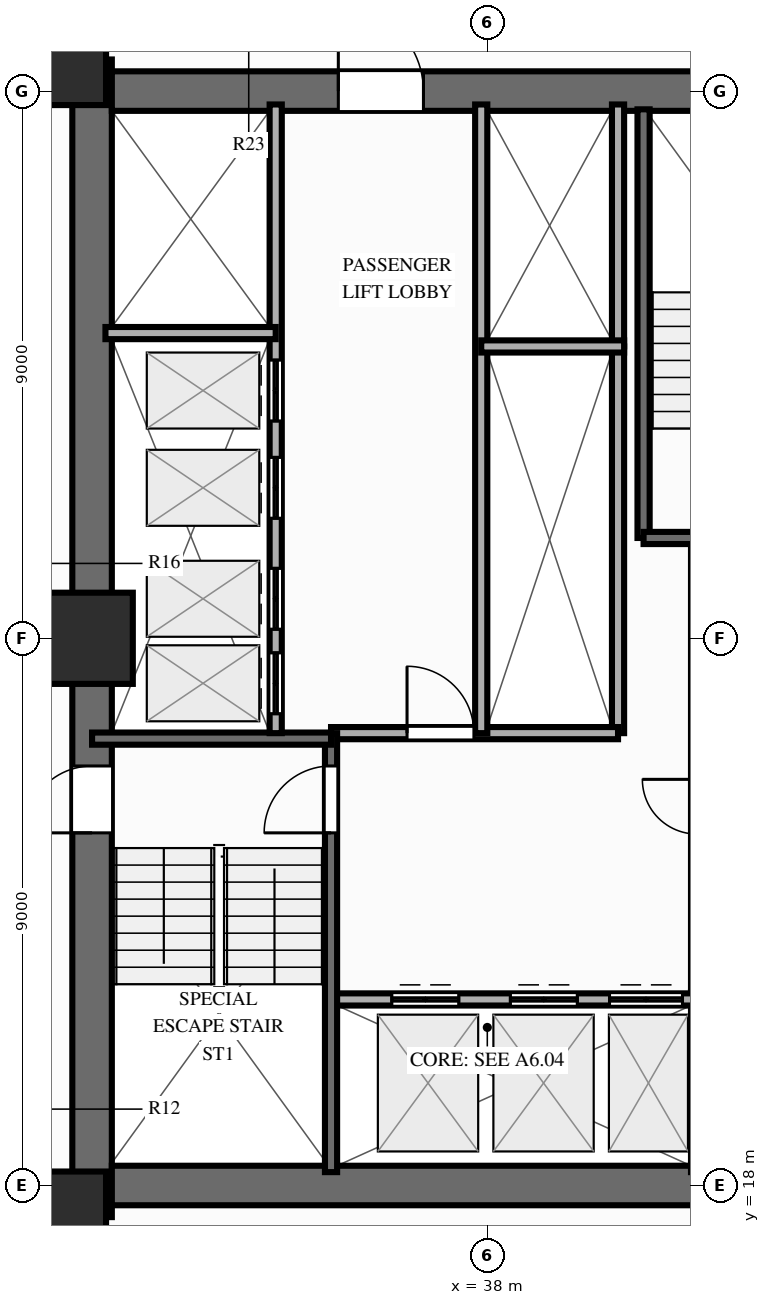
"""IFC4 building model, lengths in metres.
Left out: names, types, materials, properties, quantities, classifications, styles, units other than length and angle.
Written with IfcOpenShell. Run it as: python <this file> out.ifc"""

import sys

from ifc_helpers import new_model, si_unit, direction, frame, frame_2d, origin, origin_2d, place, context, subcontext, project, spatial, rectangle, extrude, source, transform, mapped, element, fill, save


model = new_model("IFC4")
c1 = context("Model", 3, precision=1e-05, world=origin(), true_north=direction((0.0, 1.0)))
c2 = subcontext(c1, "Body", "Model", "MODEL_VIEW")
j1 = project(units=[si_unit("LENGTHUNIT", "METRE"), si_unit("PLANEANGLEUNIT", "RADIAN")], contexts=[c1])
p1 = place(None, origin())
s1 = spatial("IfcSite", under=j1, at=p1, CompositionType="ELEMENT")
p2 = place(p1, origin())
s2 = spatial("IfcBuilding", under=s1, at=p2, CompositionType="ELEMENT")
p3 = place(p2, frame((0.0, 0.0, 46.4)))
s3 = spatial("IfcBuildingStorey", under=s2, at=p3, CompositionType="ELEMENT", Elevation=46.4)
p4 = place(p3, frame((31.5, 17.48, 0.0), z_axis=(0.0, 0.0, 1.0), x_axis=(0.0, 1.0, 0.0)))
e1 = element("IfcWall", 1, at=p4, inside=s3, PredefinedType="SHEAR", context=c2, shape_type="SweptSolid", body=[
    extrude(rectangle(XDim=19.04, YDim=0.65, at=frame_2d((9.52, 0.0))), origin(), (0.0, 0.0, 1.0), 3.0),
])
p5 = place(p4, frame((6.32, 0.0, 0.0)))
e2 = element("IfcOpeningElement", 2, at=p5, cuts=e1, PredefinedType="OPENING", context=c2, shape_type="SweptSolid", body=[
    extrude(rectangle(XDim=1.1, YDim=2.15, at=frame_2d((0.55, 1.075))), frame((0.0, 0.337, 0.0), z_axis=(0.0, -1.0, 0.0), x_axis=(1.0, 0.0, 0.0)), (0.0, 0.0, 1.0), 0.674),
])
p6 = place(p3, frame((31.825, 18.0, 0.0), z_axis=(0.0, 0.0, 1.0), x_axis=(1.0, 0.0, 0.0)))
e3 = element("IfcWall", 3, at=p6, inside=s3, PredefinedType="SHEAR", context=c2, shape_type="SweptSolid", body=[
    extrude(rectangle(XDim=12.35, YDim=0.65, at=frame_2d((6.175, 0.0))), origin(), (0.0, 0.0, 1.0), 3.0),
])
p7 = place(p3, frame((31.825, 36.0, 0.0), z_axis=(0.0, 0.0, 1.0), x_axis=(1.0, 0.0, 0.0)))
e4 = element("IfcWall", 4, at=p7, inside=s3, PredefinedType="SHEAR", context=c2, shape_type="SweptSolid", body=[
    extrude(rectangle(XDim=12.35, YDim=0.65, at=frame_2d((6.175, 0.0))), origin(), (0.0, 0.0, 1.0), 3.0),
])
p8 = place(p7, frame((5.125, 0.0, 0.0), z_axis=(0.0, 0.0, 1.0), x_axis=(-1.0, 0.0, 0.0)))
e5 = element("IfcOpeningElement", 5, at=p8, cuts=e4, PredefinedType="OPENING", context=c2, shape_type="SweptSolid", body=[
    extrude(rectangle(XDim=1.4, YDim=2.15, at=frame_2d((0.7, 1.075))), frame((0.0, 0.337, 0.0), z_axis=(0.0, -1.0, 0.0), x_axis=(1.0, 0.0, 0.0)), (0.0, 0.0, 1.0), 0.674),
])
m1 = source(origin(), c2, "Body", "SweptSolid", [
    extrude(rectangle(XDim=1.5, YDim=1.5, at=origin_2d()), origin(), (0.0, 0.0, 1.0), 3.0),
])
for number, where, z_axis, x_axis in (
    (6, (30.98, 17.48, 0.0), (0.0, 0.0, 1.0), (1.0, 0.0, 0.0)),
    (7, (30.98, 36.52, 0.0), (0.0, 0.0, 1.0), (1.0, 0.0, 0.0)),
    (8, (31.42, 27.0, 0.0), (0.0, 0.0, 1.0), (1.0, 0.0, 0.0)),
):
    element("IfcColumn", number, at=place(p3, frame(where, z_axis=z_axis, x_axis=x_axis)), inside=s3, PredefinedType="COLUMN", context=c2, shape_type="MappedRepresentation", body=[
        mapped(m1, transform((0.0, 0.0, 0.0), scale=1.0)),
    ])
p9 = place(p3, frame((41.45, 18.22, 0.0), z_axis=(0.0, 0.0, 1.0), x_axis=(0.0, 1.0, 0.0)))
e9 = element("IfcWall", 9, at=p9, inside=s3, PredefinedType="PARTITIONING", context=c2, shape_type="SweptSolid", body=[
    extrude(rectangle(XDim=2.96, YDim=0.2, at=frame_2d((1.48, 0.0))), origin(), (0.0, 0.0, 1.0), 2.79),
])
p10 = place(p3, frame((41.45, 21.18, 0.0), z_axis=(0.0, 0.0, 1.0), x_axis=(0.0, 1.0, 0.0)))
e10 = element("IfcWall", 10, at=p10, inside=s3, PredefinedType="PARTITIONING", context=c2, shape_type="SweptSolid", body=[
    extrude(rectangle(XDim=7.42, YDim=0.2, at=frame_2d((3.71, 0.0))), origin(), (0.0, 0.0, 1.0), 2.79),
])
p11 = place(p10, frame((2.6, 0.0, 0.0)))
e11 = element("IfcOpeningElement", 11, at=p11, cuts=e10, PredefinedType="OPENING", context=c2, shape_type="SweptSolid", body=[
    extrude(rectangle(XDim=0.9, YDim=2.1, at=frame_2d((0.45, 1.05))), frame((0.0, 0.112, 0.0), z_axis=(0.0, -1.0, 0.0), x_axis=(1.0, 0.0, 0.0)), (0.0, 0.0, 1.0), 0.224),
])
p12 = place(p3, frame((40.15, 25.44, 0.0), z_axis=(0.0, 0.0, 1.0), x_axis=(0.0, 1.0, 0.0)))
e12 = element("IfcWall", 12, at=p12, inside=s3, PredefinedType="PARTITIONING", context=c2, shape_type="SweptSolid", body=[
    extrude(rectangle(XDim=6.36, YDim=0.2, at=frame_2d((3.18, 0.0))), origin(), (0.0, 0.0, 1.0), 2.79),
])
p13 = place(p3, frame((40.15, 31.8, 0.0), z_axis=(0.0, 0.0, 1.0), x_axis=(0.0, 1.0, 0.0)))
e13 = element("IfcWall", 13, at=p13, inside=s3, PredefinedType="PARTITIONING", context=c2, shape_type="SweptSolid", body=[
    extrude(rectangle(XDim=3.98, YDim=0.2, at=frame_2d((1.99, 0.0))), origin(), (0.0, 0.0, 1.0), 2.79),
])
p14 = place(p3, frame((35.43, 21.06, 0.0), z_axis=(0.0, 0.0, 1.0), x_axis=(1.0, 0.0, 0.0)))
e14 = element("IfcWall", 14, at=p14, inside=s3, PredefinedType="PARTITIONING", context=c2, shape_type="SweptSolid", body=[
    extrude(rectangle(XDim=6.02, YDim=0.2, at=frame_2d((3.01, 0.0))), origin(), (0.0, 0.0, 1.0), 2.79),
])
p15 = place(p14, frame((1.0, 0.0, 0.0)))
e15 = element("IfcOpeningElement", 15, at=p15, cuts=e14, PredefinedType="OPENING", context=c2, shape_type="SweptSolid", body=[
    extrude(rectangle(XDim=1.1, YDim=2.15, at=frame_2d((0.55, 1.075))), frame((0.0, 0.112, 0.0), z_axis=(0.0, -1.0, 0.0), x_axis=(1.0, 0.0, 0.0)), (0.0, 0.0, 1.0), 0.224),
])
p16 = place(p14, frame((2.95, 0.0, 0.0)))
e16 = element("IfcOpeningElement", 16, at=p16, cuts=e14, PredefinedType="OPENING", context=c2, shape_type="SweptSolid", body=[
    extrude(rectangle(XDim=1.1, YDim=2.15, at=frame_2d((0.55, 1.075))), frame((0.0, 0.112, 0.0), z_axis=(0.0, -1.0, 0.0), x_axis=(1.0, 0.0, 0.0)), (0.0, 0.0, 1.0), 0.224),
])
p17 = place(p14, frame((4.58, 0.0, 0.0)))
e17 = element("IfcOpeningElement", 17, at=p17, cuts=e14, PredefinedType="OPENING", context=c2, shape_type="SweptSolid", body=[
    extrude(rectangle(XDim=1.2, YDim=2.15, at=frame_2d((0.6, 1.075))), frame((0.0, 0.112, 0.0), z_axis=(0.0, -1.0, 0.0), x_axis=(1.0, 0.0, 0.0)), (0.0, 0.0, 1.0), 0.224),
])
p18 = place(p3, frame((35.43, 25.44, 0.0), z_axis=(0.0, 0.0, 1.0), x_axis=(1.0, 0.0, 0.0)))
e18 = element("IfcWall", 18, at=p18, inside=s3, PredefinedType="PARTITIONING", context=c2, shape_type="SweptSolid", body=[
    extrude(rectangle(XDim=4.72, YDim=0.2, at=frame_2d((2.36, 0.0))), origin(), (0.0, 0.0, 1.0), 2.79),
])
p19 = place(p18, frame((1.25, 0.0, 0.0)))
e19 = element("IfcOpeningElement", 19, at=p19, cuts=e18, PredefinedType="OPENING", context=c2, shape_type="SweptSolid", body=[
    extrude(rectangle(XDim=1.1, YDim=2.15, at=frame_2d((0.55, 1.075))), frame((0.0, 0.112, 0.0), z_axis=(0.0, -1.0, 0.0), x_axis=(1.0, 0.0, 0.0)), (0.0, 0.0, 1.0), 0.224),
])
p20 = place(p3, frame((35.43, 18.22, 0.0), z_axis=(0.0, 0.0, 1.0), x_axis=(0.0, 1.0, 0.0)))
e20 = element("IfcWall", 20, at=p20, inside=s3, PredefinedType="SOLIDWALL", context=c2, shape_type="SweptSolid", body=[
    extrude(rectangle(XDim=7.22, YDim=0.2, at=frame_2d((3.61, 0.0))), origin(), (0.0, 0.0, 1.0), 2.79),
])
p21 = place(p20, frame((6.68, 0.0, 0.0), z_axis=(0.0, 0.0, 1.0), x_axis=(-1.0, 0.0, 0.0)))
e21 = element("IfcOpeningElement", 21, at=p21, cuts=e20, PredefinedType="OPENING", context=c2, shape_type="SweptSolid", body=[
    extrude(rectangle(XDim=1.1, YDim=2.15, at=frame_2d((0.55, 1.075))), frame((0.0, 0.112, 0.0), z_axis=(0.0, -1.0, 0.0), x_axis=(1.0, 0.0, 0.0)), (0.0, 0.0, 1.0), 0.224),
])
p22 = place(p3, frame((31.5, 25.35, 0.0), z_axis=(0.0, 0.0, 1.0), x_axis=(1.0, 0.0, 0.0)))
e22 = element("IfcWall", 22, at=p22, inside=s3, PredefinedType="SOLIDWALL", context=c2, shape_type="SweptSolid", body=[
    extrude(rectangle(XDim=3.93, YDim=0.2, at=frame_2d((1.965, 0.0))), origin(), (0.0, 0.0, 1.0), 2.79),
])
p23 = place(p3, frame((40.57, 28.65, 0.0), z_axis=(0.0, 0.0, 1.0), x_axis=(0.0, 1.0, 0.0)))
e23 = element("IfcWall", 23, at=p23, inside=s3, PredefinedType="SOLIDWALL", context=c2, shape_type="SweptSolid", body=[
    extrude(rectangle(XDim=7.05, YDim=0.2, at=frame_2d((3.525, 0.0))), origin(), (0.0, 0.0, 1.0), 2.79),
])
p24 = place(p3, frame((40.57, 28.65, 0.0), z_axis=(0.0, 0.0, 1.0), x_axis=(1.0, 0.0, 0.0)))
e24 = element("IfcWall", 24, at=p24, inside=s3, PredefinedType="SOLIDWALL", context=c2, shape_type="SweptSolid", body=[
    extrude(rectangle(XDim=3.93, YDim=0.2, at=frame_2d((1.965, 0.0))), origin(), (0.0, 0.0, 1.0), 2.79),
])
p25 = place(p3, frame((34.52, 25.44, 0.0), z_axis=(0.0, 0.0, 1.0), x_axis=(0.0, 1.0, 0.0)))
e25 = element("IfcWall", 25, at=p25, inside=s3, PredefinedType="PARTITIONING", context=c2, shape_type="SweptSolid", body=[
    extrude(rectangle(XDim=10.34, YDim=0.2, at=frame_2d((5.17, 0.0))), origin(), (0.0, 0.0, 1.0), 2.79),
])
p26 = place(p25, frame((0.32, 0.0, 0.0)))
e26 = element("IfcOpeningElement", 26, at=p26, cuts=e25, PredefinedType="OPENING", context=c2, shape_type="SweptSolid", body=[
    extrude(rectangle(XDim=1.0, YDim=2.15, at=frame_2d((0.5, 1.075))), frame((0.0, 0.112, 0.0), z_axis=(0.0, -1.0, 0.0), x_axis=(1.0, 0.0, 0.0)), (0.0, 0.0, 1.0), 0.224),
])
p27 = place(p25, frame((1.71, 0.0, 0.0)))
e27 = element("IfcOpeningElement", 27, at=p27, cuts=e25, PredefinedType="OPENING", context=c2, shape_type="SweptSolid", body=[
    extrude(rectangle(XDim=1.0, YDim=2.15, at=frame_2d((0.5, 1.075))), frame((0.0, 0.112, 0.0), z_axis=(0.0, -1.0, 0.0), x_axis=(1.0, 0.0, 0.0)), (0.0, 0.0, 1.0), 0.224),
])
p28 = place(p25, frame((3.535, 0.0, 0.0)))
e28 = element("IfcOpeningElement", 28, at=p28, cuts=e25, PredefinedType="OPENING", context=c2, shape_type="SweptSolid", body=[
    extrude(rectangle(XDim=1.0, YDim=2.15, at=frame_2d((0.5, 1.075))), frame((0.0, 0.112, 0.0), z_axis=(0.0, -1.0, 0.0), x_axis=(1.0, 0.0, 0.0)), (0.0, 0.0, 1.0), 0.224),
])
p29 = place(p25, frame((5.135, 0.0, 0.0)))
e29 = element("IfcOpeningElement", 29, at=p29, cuts=e25, PredefinedType="OPENING", context=c2, shape_type="SweptSolid", body=[
    extrude(rectangle(XDim=1.0, YDim=2.15, at=frame_2d((0.5, 1.075))), frame((0.0, 0.112, 0.0), z_axis=(0.0, -1.0, 0.0), x_axis=(1.0, 0.0, 0.0)), (0.0, 0.0, 1.0), 0.224),
])
p30 = place(p3, frame((31.72, 32.02, 0.0), z_axis=(0.0, 0.0, 1.0), x_axis=(1.0, 0.0, 0.0)))
e30 = element("IfcWall", 30, at=p30, inside=s3, PredefinedType="PARTITIONING", context=c2, shape_type="SweptSolid", body=[
    extrude(rectangle(XDim=2.8, YDim=0.2, at=frame_2d((1.4, 0.0))), origin(), (0.0, 0.0, 1.0), 2.79),
])
p31 = place(p3, frame((37.9, 25.44, 0.0), z_axis=(0.0, 0.0, 1.0), x_axis=(0.0, 1.0, 0.0)))
e31 = element("IfcWall", 31, at=p31, inside=s3, PredefinedType="PARTITIONING", context=c2, shape_type="SweptSolid", body=[
    extrude(rectangle(XDim=10.34, YDim=0.2, at=frame_2d((5.17, 0.0))), origin(), (0.0, 0.0, 1.0), 2.79),
])
p32 = place(p3, frame((37.9, 31.8, 0.0), z_axis=(0.0, 0.0, 1.0), x_axis=(1.0, 0.0, 0.0)))
e32 = element("IfcWall", 32, at=p32, inside=s3, PredefinedType="PARTITIONING", context=c2, shape_type="SweptSolid", body=[
    extrude(rectangle(XDim=2.35, YDim=0.2, at=frame_2d((1.175, 0.0))), origin(), (0.0, 0.0, 1.0), 2.79),
])
m2 = source(origin(), c2, "Body", "SweptSolid", [
    extrude(rectangle(XDim=1.1, YDim=2.15, at=frame_2d((0.55, 1.075))), frame((0.0, 0.025, 0.0), z_axis=(0.0, -1.0, 0.0), x_axis=(1.0, 0.0, 0.0)), (0.0, 0.0, 1.0), 0.05),
])
p33 = place(p5, origin())
e33 = element("IfcDoor", 33, at=p33, inside=s3, OperationType="SINGLE_SWING_LEFT", PredefinedType="DOOR", context=c2, shape_type="MappedRepresentation", body=[
    mapped(m2, transform((0.0, 0.0, 0.0), scale=1.0)),
])
fill(e2, e33)
m3 = source(origin(), c2, "Body", "SweptSolid", [
    extrude(rectangle(XDim=1.4, YDim=2.15, at=frame_2d((0.7, 1.075))), frame((0.0, 0.025, 0.0), z_axis=(0.0, -1.0, 0.0), x_axis=(1.0, 0.0, 0.0)), (0.0, 0.0, 1.0), 0.05),
])
p34 = place(p8, origin())
e34 = element("IfcDoor", 34, at=p34, inside=s3, OperationType="SINGLE_SWING_RIGHT", PredefinedType="DOOR", context=c2, shape_type="MappedRepresentation", body=[
    mapped(m3, transform((0.0, 0.0, 0.0), scale=1.0)),
])
fill(e5, e34)
p35 = place(p15, origin())
e35 = element("IfcDoor", 35, at=p35, inside=s3, OperationType="DOUBLE_DOOR_SLIDING", PredefinedType="DOOR", context=c2, shape_type="MappedRepresentation", body=[
    mapped(m2, transform((0.0, 0.0, 0.0), scale=1.0)),
])
fill(e15, e35)
p36 = place(p16, origin())
e36 = element("IfcDoor", 36, at=p36, inside=s3, OperationType="DOUBLE_DOOR_SLIDING", PredefinedType="DOOR", context=c2, shape_type="MappedRepresentation", body=[
    mapped(m2, transform((0.0, 0.0, 0.0), scale=1.0)),
])
fill(e16, e36)
m4 = source(origin(), c2, "Body", "SweptSolid", [
    extrude(rectangle(XDim=1.2, YDim=2.15, at=frame_2d((0.6, 1.075))), frame((0.0, 0.025, 0.0), z_axis=(0.0, -1.0, 0.0), x_axis=(1.0, 0.0, 0.0)), (0.0, 0.0, 1.0), 0.05),
])
p37 = place(p17, origin())
e37 = element("IfcDoor", 37, at=p37, inside=s3, OperationType="DOUBLE_DOOR_SLIDING", PredefinedType="DOOR", context=c2, shape_type="MappedRepresentation", body=[
    mapped(m4, transform((0.0, 0.0, 0.0), scale=1.0)),
])
fill(e17, e37)
p38 = place(p19, origin())
e38 = element("IfcDoor", 38, at=p38, inside=s3, OperationType="SINGLE_SWING_LEFT", PredefinedType="DOOR", context=c2, shape_type="MappedRepresentation", body=[
    mapped(m2, transform((0.0, 0.0, 0.0), scale=1.0)),
])
fill(e19, e38)
p39 = place(p21, origin())
e39 = element("IfcDoor", 39, at=p39, inside=s3, OperationType="SINGLE_SWING_RIGHT", PredefinedType="DOOR", context=c2, shape_type="MappedRepresentation", body=[
    mapped(m2, transform((0.0, 0.0, 0.0), scale=1.0)),
])
fill(e21, e39)
m5 = source(origin(), c2, "Body", "SweptSolid", [
    extrude(rectangle(XDim=1.0, YDim=2.15, at=frame_2d((0.5, 1.075))), frame((0.0, 0.025, 0.0), z_axis=(0.0, -1.0, 0.0), x_axis=(1.0, 0.0, 0.0)), (0.0, 0.0, 1.0), 0.05),
])
p40 = place(p26, origin())
e40 = element("IfcDoor", 40, at=p40, inside=s3, OperationType="DOUBLE_DOOR_SLIDING", PredefinedType="DOOR", context=c2, shape_type="MappedRepresentation", body=[
    mapped(m5, transform((0.0, 0.0, 0.0), scale=1.0)),
])
fill(e26, e40)
p41 = place(p27, origin())
e41 = element("IfcDoor", 41, at=p41, inside=s3, OperationType="DOUBLE_DOOR_SLIDING", PredefinedType="DOOR", context=c2, shape_type="MappedRepresentation", body=[
    mapped(m5, transform((0.0, 0.0, 0.0), scale=1.0)),
])
fill(e27, e41)
p42 = place(p28, origin())
e42 = element("IfcDoor", 42, at=p42, inside=s3, OperationType="DOUBLE_DOOR_SLIDING", PredefinedType="DOOR", context=c2, shape_type="MappedRepresentation", body=[
    mapped(m5, transform((0.0, 0.0, 0.0), scale=1.0)),
])
fill(e28, e42)
p43 = place(p29, origin())
e43 = element("IfcDoor", 43, at=p43, inside=s3, OperationType="DOUBLE_DOOR_SLIDING", PredefinedType="DOOR", context=c2, shape_type="MappedRepresentation", body=[
    mapped(m5, transform((0.0, 0.0, 0.0), scale=1.0)),
])
fill(e29, e43)
save(model, sys.argv[1])
